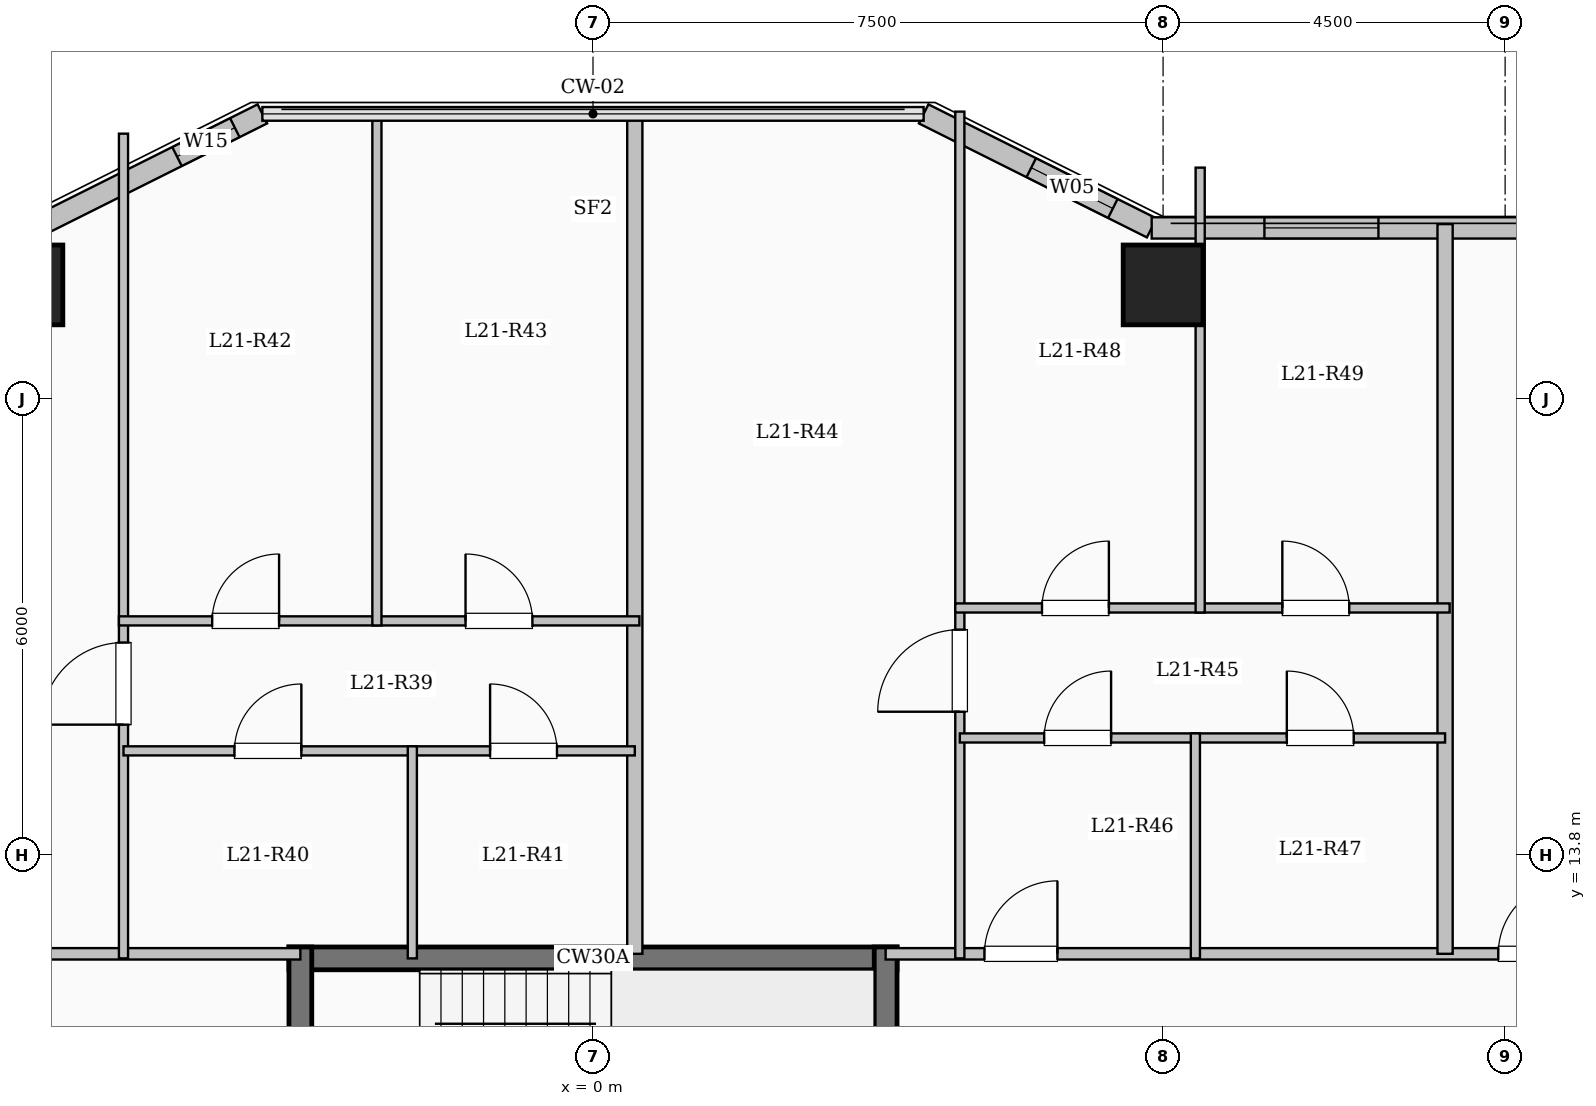
"""IFC4 building model, lengths in metres.
Left out: names, types, materials, properties, quantities, classifications, styles, units other than length and angle.
Written with IfcOpenShell. Run it as: python <this file> out.ifc"""

import sys

from ifc_helpers import new_model, si_unit, direction, frame, frame_2d, origin, origin_2d, place, context, subcontext, project, spatial, rectangle, extrude, element, fill, save


model = new_model("IFC4")
c1 = context("Model", 3, precision=1e-05, world=origin(), true_north=direction((0.0, 1.0)))
c2 = subcontext(c1, "Body", "Model", "MODEL_VIEW")
j1 = project(units=[si_unit("LENGTHUNIT", "METRE"), si_unit("PLANEANGLEUNIT", "RADIAN")], contexts=[c1])
p1 = place(None, origin())
s1 = spatial("IfcSite", under=j1, at=p1, CompositionType="ELEMENT")
p2 = place(p1, origin())
s2 = spatial("IfcBuilding", under=s1, at=p2, CompositionType="ELEMENT")
p3 = place(p2, frame((0.0, 0.0, 81.65)))
s3 = spatial("IfcBuildingStorey", under=s2, at=p3, CompositionType="ELEMENT", Elevation=81.65)
for number, where, z_axis, x_axis in (
    (1, (-7.5, 21.3, 0.0), (0.0, 0.0, 1.0), (1.0, 0.0, 0.0)),
    (2, (7.5, 21.3, 0.0), (0.0, 0.0, 1.0), (1.0, 0.0, 0.0)),
):
    element("IfcColumn", number, at=place(p3, frame(where, z_axis=z_axis, x_axis=x_axis)), inside=s3, PredefinedType="COLUMN", context=c2, shape_type="SweptSolid", body=[
        extrude(rectangle(XDim=1.05, YDim=1.05, at=origin_2d()), origin(), (0.0, 0.0, 1.0), 3.35),
    ])
p4 = place(p3, frame((-7.35, 22.05, 0.0), z_axis=(0.0, 0.0, 1.0), x_axis=(0.894427191, 0.4472135955, 0.0)))
e3 = element("IfcWall", 3, at=p4, inside=s3, PredefinedType="SOLIDWALL", context=c2, shape_type="SweptSolid", body=[
    extrude(rectangle(XDim=3.354, YDim=0.28, at=frame_2d((1.677, 0.0))), origin(), (0.0, 0.0, 1.0), 3.1),
])
p5 = place(p4, frame((2.099, 0.0, 0.95)))
e4 = element("IfcOpeningElement", 4, at=p5, cuts=e3, PredefinedType="OPENING", context=c2, shape_type="SweptSolid", body=[
    extrude(rectangle(XDim=0.85, YDim=1.5, at=frame_2d((0.425, 0.75))), frame((0.0, 0.15, 0.0), z_axis=(0.0, -1.0, 0.0), x_axis=(1.0, 0.0, 0.0)), (0.0, 0.0, 1.0), 0.3),
])
p6 = place(p3, frame((4.35, 23.55, 0.0), z_axis=(0.0, 0.0, 1.0), x_axis=(0.894427191, -0.4472135955, 0.0)))
e5 = element("IfcWall", 5, at=p6, inside=s3, PredefinedType="SOLIDWALL", context=c2, shape_type="SweptSolid", body=[
    extrude(rectangle(XDim=3.354, YDim=0.28, at=frame_2d((1.677, 0.0))), origin(), (0.0, 0.0, 1.0), 3.1),
])
p7 = place(p6, frame((1.583, 0.0, 0.95)))
e6 = element("IfcOpeningElement", 6, at=p7, cuts=e5, PredefinedType="OPENING", context=c2, shape_type="SweptSolid", body=[
    extrude(rectangle(XDim=1.2, YDim=1.5, at=frame_2d((0.6, 0.75))), frame((0.0, 0.15, 0.0), z_axis=(0.0, -1.0, 0.0), x_axis=(1.0, 0.0, 0.0)), (0.0, 0.0, 1.0), 0.3),
])
p8 = place(p3, frame((7.35, 22.05, 0.0), z_axis=(0.0, 0.0, 1.0), x_axis=(1.0, 0.0, 0.0)))
e7 = element("IfcWall", 7, at=p8, inside=s3, PredefinedType="SOLIDWALL", context=c2, shape_type="SweptSolid", body=[
    extrude(rectangle(XDim=13.8, YDim=0.28, at=frame_2d((6.9, 0.0))), origin(), (0.0, 0.0, 1.0), 3.1),
])
p9 = place(p8, frame((1.483, 0.0, 0.9)))
e8 = element("IfcOpeningElement", 8, at=p9, cuts=e7, PredefinedType="OPENING", context=c2, shape_type="SweptSolid", body=[
    extrude(rectangle(XDim=1.5, YDim=1.65, at=frame_2d((0.75, 0.825))), frame((0.0, 0.15, 0.0), z_axis=(0.0, -1.0, 0.0), x_axis=(1.0, 0.0, 0.0)), (0.0, 0.0, 1.0), 0.3),
])
p10 = place(p8, frame((5.198, 0.0, 0.9)))
e9 = element("IfcOpeningElement", 9, at=p10, cuts=e7, PredefinedType="OPENING", context=c2, shape_type="SweptSolid", body=[
    extrude(rectangle(XDim=2.4, YDim=1.8, at=frame_2d((1.2, 0.9))), frame((0.0, 0.15, 0.0), z_axis=(0.0, -1.0, 0.0), x_axis=(1.0, 0.0, 0.0)), (0.0, 0.0, 1.0), 0.3),
])
p11 = place(p8, frame((10.441, 0.0, 0.9)))
e10 = element("IfcOpeningElement", 10, at=p11, cuts=e7, PredefinedType="OPENING", context=c2, shape_type="SweptSolid", body=[
    extrude(rectangle(XDim=1.8, YDim=1.65, at=frame_2d((0.9, 0.825))), frame((0.0, 0.15, 0.0), z_axis=(0.0, -1.0, 0.0), x_axis=(1.0, 0.0, 0.0)), (0.0, 0.0, 1.0), 0.3),
])
p12 = place(p3, frame((-4.0, 12.44, 0.0), z_axis=(0.0, 0.0, 1.0), x_axis=(1.0, 0.0, 0.0)))
e11 = element("IfcWall", 11, at=p12, inside=s3, PredefinedType="SHEAR", context=c2, shape_type="SweptSolid", body=[
    extrude(rectangle(XDim=8.0, YDim=0.3, at=frame_2d((4.0, 0.0))), origin(), (0.0, 0.0, 1.0), 3.35),
])
for number, where, z_axis, x_axis in (
    (12, (-3.85, 9.0, 0.0), (0.0, 0.0, 1.0), (0.0, 1.0, 0.0)),
    (13, (3.85, 9.0, 0.0), (0.0, 0.0, 1.0), (0.0, 1.0, 0.0)),
):
    element("IfcWall", number, at=place(p3, frame(where, z_axis=z_axis, x_axis=x_axis)), inside=s3, PredefinedType="SHEAR", context=c2, shape_type="SweptSolid", body=[
        extrude(rectangle(XDim=3.59, YDim=0.3, at=frame_2d((1.795, 0.0))), origin(), (0.0, 0.0, 1.0), 3.35),
    ])
p13 = place(p3, frame((-21.05, 12.5, 0.0), z_axis=(0.0, 0.0, 1.0), x_axis=(1.0, 0.0, 0.0)))
e14 = element("IfcWall", 14, at=p13, inside=s3, PredefinedType="PARTITIONING", context=c2, shape_type="SweptSolid", body=[
    extrude(rectangle(XDim=17.2, YDim=0.15, at=frame_2d((8.6, 0.0))), origin(), (0.0, 0.0, 1.0), 3.1),
])
p14 = place(p13, frame((0.7, 0.0, 0.0)))
e15 = element("IfcOpeningElement", 15, at=p14, cuts=e14, PredefinedType="OPENING", context=c2, shape_type="SweptSolid", body=[
    extrude(rectangle(XDim=0.96, YDim=2.15, at=frame_2d((0.48, 1.075))), frame((0.0, 0.085, 0.0), z_axis=(0.0, -1.0, 0.0), x_axis=(1.0, 0.0, 0.0)), (0.0, 0.0, 1.0), 0.17),
])
p15 = place(p13, frame((11.068, 0.0, 0.0)))
e16 = element("IfcOpeningElement", 16, at=p15, cuts=e14, PredefinedType="OPENING", context=c2, shape_type="SweptSolid", body=[
    extrude(rectangle(XDim=0.96, YDim=2.15, at=frame_2d((0.48, 1.075))), frame((0.0, 0.085, 0.0), z_axis=(0.0, -1.0, 0.0), x_axis=(1.0, 0.0, 0.0)), (0.0, 0.0, 1.0), 0.17),
])
p16 = place(p3, frame((3.85, 12.5, 0.0), z_axis=(0.0, 0.0, 1.0), x_axis=(1.0, 0.0, 0.0)))
e17 = element("IfcWall", 17, at=p16, inside=s3, PredefinedType="PARTITIONING", context=c2, shape_type="SweptSolid", body=[
    extrude(rectangle(XDim=17.2, YDim=0.15, at=frame_2d((8.6, 0.0))), origin(), (0.0, 0.0, 1.0), 3.1),
])
p17 = place(p16, frame((1.3, 0.0, 0.0)))
e18 = element("IfcOpeningElement", 18, at=p17, cuts=e17, PredefinedType="OPENING", context=c2, shape_type="SweptSolid", body=[
    extrude(rectangle(XDim=0.96, YDim=2.15, at=frame_2d((0.48, 1.075))), frame((0.0, 0.085, 0.0), z_axis=(0.0, -1.0, 0.0), x_axis=(1.0, 0.0, 0.0)), (0.0, 0.0, 1.0), 0.17),
])
p18 = place(p16, frame((8.06, 0.0, 0.0)))
e19 = element("IfcOpeningElement", 19, at=p18, cuts=e17, PredefinedType="OPENING", context=c2, shape_type="SweptSolid", body=[
    extrude(rectangle(XDim=0.96, YDim=2.15, at=frame_2d((0.48, 1.075))), frame((0.0, 0.085, 0.0), z_axis=(0.0, -1.0, 0.0), x_axis=(1.0, 0.0, 0.0)), (0.0, 0.0, 1.0), 0.17),
])
p19 = place(p3, frame((0.55, 12.5, 0.0), z_axis=(0.0, 0.0, 1.0), x_axis=(0.0, 1.0, 0.0)))
e20 = element("IfcWall", 20, at=p19, inside=s3, PredefinedType="SOLIDWALL", context=c2, shape_type="SweptSolid", body=[
    extrude(rectangle(XDim=11.08, YDim=0.2, at=frame_2d((5.54, 0.0))), origin(), (0.0, 0.0, 1.0), 3.1),
])
p20 = place(p3, frame((-6.177, 12.44, 0.0), z_axis=(0.0, 0.0, 1.0), x_axis=(0.0, 1.0, 0.0)))
e21 = element("IfcWall", 21, at=p20, inside=s3, PredefinedType="PARTITIONING", context=c2, shape_type="SweptSolid", body=[
    extrude(rectangle(XDim=10.85, YDim=0.12, at=frame_2d((5.425, 0.0))), origin(), (0.0, 0.0, 1.0), 3.1),
])
p21 = place(p20, frame((3.075, 0.0, 0.0)))
e22 = element("IfcOpeningElement", 22, at=p21, cuts=e21, PredefinedType="OPENING", context=c2, shape_type="SweptSolid", body=[
    extrude(rectangle(XDim=1.08, YDim=2.15, at=frame_2d((0.54, 1.075))), frame((0.0, 0.07, 0.0), z_axis=(0.0, -1.0, 0.0), x_axis=(1.0, 0.0, 0.0)), (0.0, 0.0, 1.0), 0.14),
])
p22 = place(p3, frame((-6.177, 15.17, 0.0), z_axis=(0.0, 0.0, 1.0), x_axis=(1.0, 0.0, 0.0)))
e23 = element("IfcWall", 23, at=p22, inside=s3, PredefinedType="PARTITIONING", context=c2, shape_type="SweptSolid", body=[
    extrude(rectangle(XDim=3.8, YDim=0.12, at=frame_2d((1.9, 0.0))), origin(), (0.0, 0.0, 1.0), 3.1),
])
p23 = place(p22, frame((1.46, 0.0, 0.0)))
e24 = element("IfcOpeningElement", 24, at=p23, cuts=e23, PredefinedType="OPENING", context=c2, shape_type="SweptSolid", body=[
    extrude(rectangle(XDim=0.88, YDim=2.1, at=frame_2d((0.44, 1.05))), frame((0.0, 0.07, 0.0), z_axis=(0.0, -1.0, 0.0), x_axis=(1.0, 0.0, 0.0)), (0.0, 0.0, 1.0), 0.14),
])
p24 = place(p3, frame((-2.377, 15.17, 0.0), z_axis=(0.0, 0.0, 1.0), x_axis=(1.0, 0.0, 0.0)))
e25 = element("IfcWall", 25, at=p24, inside=s3, PredefinedType="PARTITIONING", context=c2, shape_type="SweptSolid", body=[
    extrude(rectangle(XDim=2.927, YDim=0.12, at=frame_2d((1.463, 0.0))), origin(), (0.0, 0.0, 1.0), 3.1),
])
p25 = place(p24, frame((1.023, 0.0, 0.0)))
e26 = element("IfcOpeningElement", 26, at=p25, cuts=e25, PredefinedType="OPENING", context=c2, shape_type="SweptSolid", body=[
    extrude(rectangle(XDim=0.88, YDim=2.1, at=frame_2d((0.44, 1.05))), frame((0.0, 0.07, 0.0), z_axis=(0.0, -1.0, 0.0), x_axis=(1.0, 0.0, 0.0)), (0.0, 0.0, 1.0), 0.14),
])
p26 = place(p3, frame((-6.237, 16.88, 0.0), z_axis=(0.0, 0.0, 1.0), x_axis=(1.0, 0.0, 0.0)))
e27 = element("IfcWall", 27, at=p26, inside=s3, PredefinedType="PARTITIONING", context=c2, shape_type="SweptSolid", body=[
    extrude(rectangle(XDim=6.847, YDim=0.12, at=frame_2d((3.424, 0.0))), origin(), (0.0, 0.0, 1.0), 3.1),
])
p27 = place(p26, frame((1.227, 0.0, 0.0)))
e28 = element("IfcOpeningElement", 28, at=p27, cuts=e27, PredefinedType="OPENING", context=c2, shape_type="SweptSolid", body=[
    extrude(rectangle(XDim=0.88, YDim=2.1, at=frame_2d((0.44, 1.05))), frame((0.0, 0.07, 0.0), z_axis=(0.0, -1.0, 0.0), x_axis=(1.0, 0.0, 0.0)), (0.0, 0.0, 1.0), 0.14),
])
p28 = place(p26, frame((4.56, 0.0, 0.0)))
e29 = element("IfcOpeningElement", 29, at=p28, cuts=e27, PredefinedType="OPENING", context=c2, shape_type="SweptSolid", body=[
    extrude(rectangle(XDim=0.88, YDim=2.1, at=frame_2d((0.44, 1.05))), frame((0.0, 0.07, 0.0), z_axis=(0.0, -1.0, 0.0), x_axis=(1.0, 0.0, 0.0)), (0.0, 0.0, 1.0), 0.14),
])
p29 = place(p3, frame((-2.377, 12.44, 0.0), z_axis=(0.0, 0.0, 1.0), x_axis=(0.0, 1.0, 0.0)))
e30 = element("IfcWall", 30, at=p29, inside=s3, PredefinedType="PARTITIONING", context=c2, shape_type="SweptSolid", body=[
    extrude(rectangle(XDim=2.79, YDim=0.12, at=frame_2d((1.395, 0.0))), origin(), (0.0, 0.0, 1.0), 3.1),
])
p30 = place(p3, frame((-2.843, 16.82, 0.0), z_axis=(0.0, 0.0, 1.0), x_axis=(0.0, 1.0, 0.0)))
e31 = element("IfcWall", 31, at=p30, inside=s3, PredefinedType="PARTITIONING", context=c2, shape_type="SweptSolid", body=[
    extrude(rectangle(XDim=6.76, YDim=0.12, at=frame_2d((3.38, 0.0))), origin(), (0.0, 0.0, 1.0), 3.1),
])
p31 = place(p3, frame((11.21, 12.5, 0.0), z_axis=(0.0, 0.0, 1.0), x_axis=(0.0, 1.0, 0.0)))
e32 = element("IfcWall", 32, at=p31, inside=s3, PredefinedType="SOLIDWALL", context=c2, shape_type="SweptSolid", body=[
    extrude(rectangle(XDim=9.6, YDim=0.2, at=frame_2d((4.8, 0.0))), origin(), (0.0, 0.0, 1.0), 3.1),
])
p32 = place(p3, frame((4.826, 12.44, 0.0), z_axis=(0.0, 0.0, 1.0), x_axis=(0.0, 1.0, 0.0)))
e33 = element("IfcWall", 33, at=p32, inside=s3, PredefinedType="PARTITIONING", context=c2, shape_type="SweptSolid", body=[
    extrude(rectangle(XDim=11.14, YDim=0.12, at=frame_2d((5.57, 0.0))), origin(), (0.0, 0.0, 1.0), 3.1),
])
p33 = place(p32, frame((3.245, 0.0, 0.0)))
e34 = element("IfcOpeningElement", 34, at=p33, cuts=e33, PredefinedType="OPENING", context=c2, shape_type="SweptSolid", body=[
    extrude(rectangle(XDim=1.08, YDim=2.15, at=frame_2d((0.54, 1.075))), frame((0.0, 0.07, 0.0), z_axis=(0.0, -1.0, 0.0), x_axis=(1.0, 0.0, 0.0)), (0.0, 0.0, 1.0), 0.14),
])
p34 = place(p3, frame((4.826, 15.34, 0.0), z_axis=(0.0, 0.0, 1.0), x_axis=(1.0, 0.0, 0.0)))
e35 = element("IfcWall", 35, at=p34, inside=s3, PredefinedType="PARTITIONING", context=c2, shape_type="SweptSolid", body=[
    extrude(rectangle(XDim=3.099, YDim=0.12, at=frame_2d((1.55, 0.0))), origin(), (0.0, 0.0, 1.0), 3.1),
])
p35 = place(p34, frame((1.11, 0.0, 0.0)))
e36 = element("IfcOpeningElement", 36, at=p35, cuts=e35, PredefinedType="OPENING", context=c2, shape_type="SweptSolid", body=[
    extrude(rectangle(XDim=0.88, YDim=2.1, at=frame_2d((0.44, 1.05))), frame((0.0, 0.07, 0.0), z_axis=(0.0, -1.0, 0.0), x_axis=(1.0, 0.0, 0.0)), (0.0, 0.0, 1.0), 0.14),
])
p36 = place(p3, frame((7.925, 15.34, 0.0), z_axis=(0.0, 0.0, 1.0), x_axis=(1.0, 0.0, 0.0)))
e37 = element("IfcWall", 37, at=p36, inside=s3, PredefinedType="PARTITIONING", context=c2, shape_type="SweptSolid", body=[
    extrude(rectangle(XDim=3.285, YDim=0.12, at=frame_2d((1.643, 0.0))), origin(), (0.0, 0.0, 1.0), 3.1),
])
p37 = place(p36, frame((1.203, 0.0, 0.0)))
e38 = element("IfcOpeningElement", 38, at=p37, cuts=e37, PredefinedType="OPENING", context=c2, shape_type="SweptSolid", body=[
    extrude(rectangle(XDim=0.88, YDim=2.1, at=frame_2d((0.44, 1.05))), frame((0.0, 0.07, 0.0), z_axis=(0.0, -1.0, 0.0), x_axis=(1.0, 0.0, 0.0)), (0.0, 0.0, 1.0), 0.14),
])
p38 = place(p3, frame((4.766, 17.05, 0.0), z_axis=(0.0, 0.0, 1.0), x_axis=(1.0, 0.0, 0.0)))
e39 = element("IfcWall", 39, at=p38, inside=s3, PredefinedType="PARTITIONING", context=c2, shape_type="SweptSolid", body=[
    extrude(rectangle(XDim=6.504, YDim=0.12, at=frame_2d((3.252, 0.0))), origin(), (0.0, 0.0, 1.0), 3.1),
])
p39 = place(p38, frame((1.141, 0.0, 0.0)))
e40 = element("IfcOpeningElement", 40, at=p39, cuts=e39, PredefinedType="OPENING", context=c2, shape_type="SweptSolid", body=[
    extrude(rectangle(XDim=0.88, YDim=2.1, at=frame_2d((0.44, 1.05))), frame((0.0, 0.07, 0.0), z_axis=(0.0, -1.0, 0.0), x_axis=(1.0, 0.0, 0.0)), (0.0, 0.0, 1.0), 0.14),
])
p40 = place(p38, frame((4.303, 0.0, 0.0)))
e41 = element("IfcOpeningElement", 41, at=p40, cuts=e39, PredefinedType="OPENING", context=c2, shape_type="SweptSolid", body=[
    extrude(rectangle(XDim=0.88, YDim=2.1, at=frame_2d((0.44, 1.05))), frame((0.0, 0.07, 0.0), z_axis=(0.0, -1.0, 0.0), x_axis=(1.0, 0.0, 0.0)), (0.0, 0.0, 1.0), 0.14),
])
p41 = place(p3, frame((7.925, 12.44, 0.0), z_axis=(0.0, 0.0, 1.0), x_axis=(0.0, 1.0, 0.0)))
e42 = element("IfcWall", 42, at=p41, inside=s3, PredefinedType="PARTITIONING", context=c2, shape_type="SweptSolid", body=[
    extrude(rectangle(XDim=2.96, YDim=0.12, at=frame_2d((1.48, 0.0))), origin(), (0.0, 0.0, 1.0), 2.435),
])
p42 = place(p3, frame((7.988, 16.99, 0.0), z_axis=(0.0, 0.0, 1.0), x_axis=(0.0, 1.0, 0.0)))
e43 = element("IfcWall", 43, at=p42, inside=s3, PredefinedType="PARTITIONING", context=c2, shape_type="SweptSolid", body=[
    extrude(rectangle(XDim=5.853, YDim=0.12, at=frame_2d((2.927, 0.0))), origin(), (0.0, 0.0, 1.0), 2.435),
])
p43 = place(p5, origin())
e44 = element("IfcWindow", 44, at=p43, inside=s3, PartitioningType="SINGLE_PANEL", PredefinedType="WINDOW", context=c2, shape_type="SweptSolid", body=[
    extrude(rectangle(XDim=0.85, YDim=1.5, at=frame_2d((0.425, 0.75))), frame((0.0, 0.03, 0.0), z_axis=(0.0, -1.0, 0.0), x_axis=(1.0, 0.0, 0.0)), (0.0, 0.0, 1.0), 0.06),
])
fill(e4, e44)
p44 = place(p7, origin())
e45 = element("IfcWindow", 45, at=p44, inside=s3, PartitioningType="SINGLE_PANEL", PredefinedType="WINDOW", context=c2, shape_type="SweptSolid", body=[
    extrude(rectangle(XDim=1.2, YDim=1.5, at=frame_2d((0.6, 0.75))), frame((0.0, 0.03, 0.0), z_axis=(0.0, -1.0, 0.0), x_axis=(1.0, 0.0, 0.0)), (0.0, 0.0, 1.0), 0.06),
])
fill(e6, e45)
p45 = place(p9, origin())
e46 = element("IfcWindow", 46, at=p45, inside=s3, PartitioningType="SINGLE_PANEL", PredefinedType="WINDOW", context=c2, shape_type="SweptSolid", body=[
    extrude(rectangle(XDim=1.5, YDim=1.65, at=frame_2d((0.75, 0.825))), frame((0.0, 0.03, 0.0), z_axis=(0.0, -1.0, 0.0), x_axis=(1.0, 0.0, 0.0)), (0.0, 0.0, 1.0), 0.06),
])
fill(e8, e46)
p46 = place(p21, origin())
e47 = element("IfcDoor", 47, at=p46, inside=s3, OperationType="SINGLE_SWING_LEFT", PredefinedType="DOOR", context=c2, shape_type="SweptSolid", body=[
    extrude(rectangle(XDim=1.08, YDim=2.15, at=frame_2d((0.54, 1.075))), frame((0.0, 0.025, 0.0), z_axis=(0.0, -1.0, 0.0), x_axis=(1.0, 0.0, 0.0)), (0.0, 0.0, 1.0), 0.05),
])
fill(e22, e47)
p47 = place(p23, origin())
e48 = element("IfcDoor", 48, at=p47, inside=s3, OperationType="SINGLE_SWING_RIGHT", PredefinedType="DOOR", context=c2, shape_type="SweptSolid", body=[
    extrude(rectangle(XDim=0.88, YDim=2.1, at=frame_2d((0.44, 1.05))), frame((0.0, 0.025, 0.0), z_axis=(0.0, -1.0, 0.0), x_axis=(1.0, 0.0, 0.0)), (0.0, 0.0, 1.0), 0.05),
])
fill(e24, e48)
p48 = place(p25, origin())
e49 = element("IfcDoor", 49, at=p48, inside=s3, OperationType="SINGLE_SWING_LEFT", PredefinedType="DOOR", context=c2, shape_type="SweptSolid", body=[
    extrude(rectangle(XDim=0.88, YDim=2.1, at=frame_2d((0.44, 1.05))), frame((0.0, 0.025, 0.0), z_axis=(0.0, -1.0, 0.0), x_axis=(1.0, 0.0, 0.0)), (0.0, 0.0, 1.0), 0.05),
])
fill(e26, e49)
p49 = place(p27, origin())
e50 = element("IfcDoor", 50, at=p49, inside=s3, OperationType="SINGLE_SWING_RIGHT", PredefinedType="DOOR", context=c2, shape_type="SweptSolid", body=[
    extrude(rectangle(XDim=0.88, YDim=2.1, at=frame_2d((0.44, 1.05))), frame((0.0, 0.025, 0.0), z_axis=(0.0, -1.0, 0.0), x_axis=(1.0, 0.0, 0.0)), (0.0, 0.0, 1.0), 0.05),
])
fill(e28, e50)
p50 = place(p28, origin())
e51 = element("IfcDoor", 51, at=p50, inside=s3, OperationType="SINGLE_SWING_LEFT", PredefinedType="DOOR", context=c2, shape_type="SweptSolid", body=[
    extrude(rectangle(XDim=0.88, YDim=2.1, at=frame_2d((0.44, 1.05))), frame((0.0, 0.025, 0.0), z_axis=(0.0, -1.0, 0.0), x_axis=(1.0, 0.0, 0.0)), (0.0, 0.0, 1.0), 0.05),
])
fill(e29, e51)
p51 = place(p17, origin())
e52 = element("IfcDoor", 52, at=p51, inside=s3, OperationType="SINGLE_SWING_RIGHT", PredefinedType="DOOR", context=c2, shape_type="SweptSolid", body=[
    extrude(rectangle(XDim=0.96, YDim=2.15, at=frame_2d((0.48, 1.075))), frame((0.0, 0.025, 0.0), z_axis=(0.0, -1.0, 0.0), x_axis=(1.0, 0.0, 0.0)), (0.0, 0.0, 1.0), 0.05),
])
fill(e18, e52)
p52 = place(p33, origin())
e53 = element("IfcDoor", 53, at=p52, inside=s3, OperationType="SINGLE_SWING_LEFT", PredefinedType="DOOR", context=c2, shape_type="SweptSolid", body=[
    extrude(rectangle(XDim=1.08, YDim=2.15, at=frame_2d((0.54, 1.075))), frame((0.0, 0.025, 0.0), z_axis=(0.0, -1.0, 0.0), x_axis=(1.0, 0.0, 0.0)), (0.0, 0.0, 1.0), 0.05),
])
fill(e34, e53)
p53 = place(p35, origin())
e54 = element("IfcDoor", 54, at=p53, inside=s3, OperationType="SINGLE_SWING_RIGHT", PredefinedType="DOOR", context=c2, shape_type="SweptSolid", body=[
    extrude(rectangle(XDim=0.88, YDim=2.1, at=frame_2d((0.44, 1.05))), frame((0.0, 0.025, 0.0), z_axis=(0.0, -1.0, 0.0), x_axis=(1.0, 0.0, 0.0)), (0.0, 0.0, 1.0), 0.05),
])
fill(e36, e54)
p54 = place(p37, origin())
e55 = element("IfcDoor", 55, at=p54, inside=s3, OperationType="SINGLE_SWING_LEFT", PredefinedType="DOOR", context=c2, shape_type="SweptSolid", body=[
    extrude(rectangle(XDim=0.88, YDim=2.1, at=frame_2d((0.44, 1.05))), frame((0.0, 0.025, 0.0), z_axis=(0.0, -1.0, 0.0), x_axis=(1.0, 0.0, 0.0)), (0.0, 0.0, 1.0), 0.05),
])
fill(e38, e55)
p55 = place(p39, origin())
e56 = element("IfcDoor", 56, at=p55, inside=s3, OperationType="SINGLE_SWING_RIGHT", PredefinedType="DOOR", context=c2, shape_type="SweptSolid", body=[
    extrude(rectangle(XDim=0.88, YDim=2.1, at=frame_2d((0.44, 1.05))), frame((0.0, 0.025, 0.0), z_axis=(0.0, -1.0, 0.0), x_axis=(1.0, 0.0, 0.0)), (0.0, 0.0, 1.0), 0.05),
])
fill(e40, e56)
p56 = place(p40, origin())
e57 = element("IfcDoor", 57, at=p56, inside=s3, OperationType="SINGLE_SWING_LEFT", PredefinedType="DOOR", context=c2, shape_type="SweptSolid", body=[
    extrude(rectangle(XDim=0.88, YDim=2.1, at=frame_2d((0.44, 1.05))), frame((0.0, 0.025, 0.0), z_axis=(0.0, -1.0, 0.0), x_axis=(1.0, 0.0, 0.0)), (0.0, 0.0, 1.0), 0.05),
])
fill(e41, e57)
p57 = place(p18, origin())
e58 = element("IfcDoor", 58, at=p57, inside=s3, OperationType="SINGLE_SWING_RIGHT", PredefinedType="DOOR", context=c2, shape_type="SweptSolid", body=[
    extrude(rectangle(XDim=0.96, YDim=2.15, at=frame_2d((0.48, 1.075))), frame((0.0, 0.025, 0.0), z_axis=(0.0, -1.0, 0.0), x_axis=(1.0, 0.0, 0.0)), (0.0, 0.0, 1.0), 0.05),
])
fill(e19, e58)
save(model, sys.argv[1])
